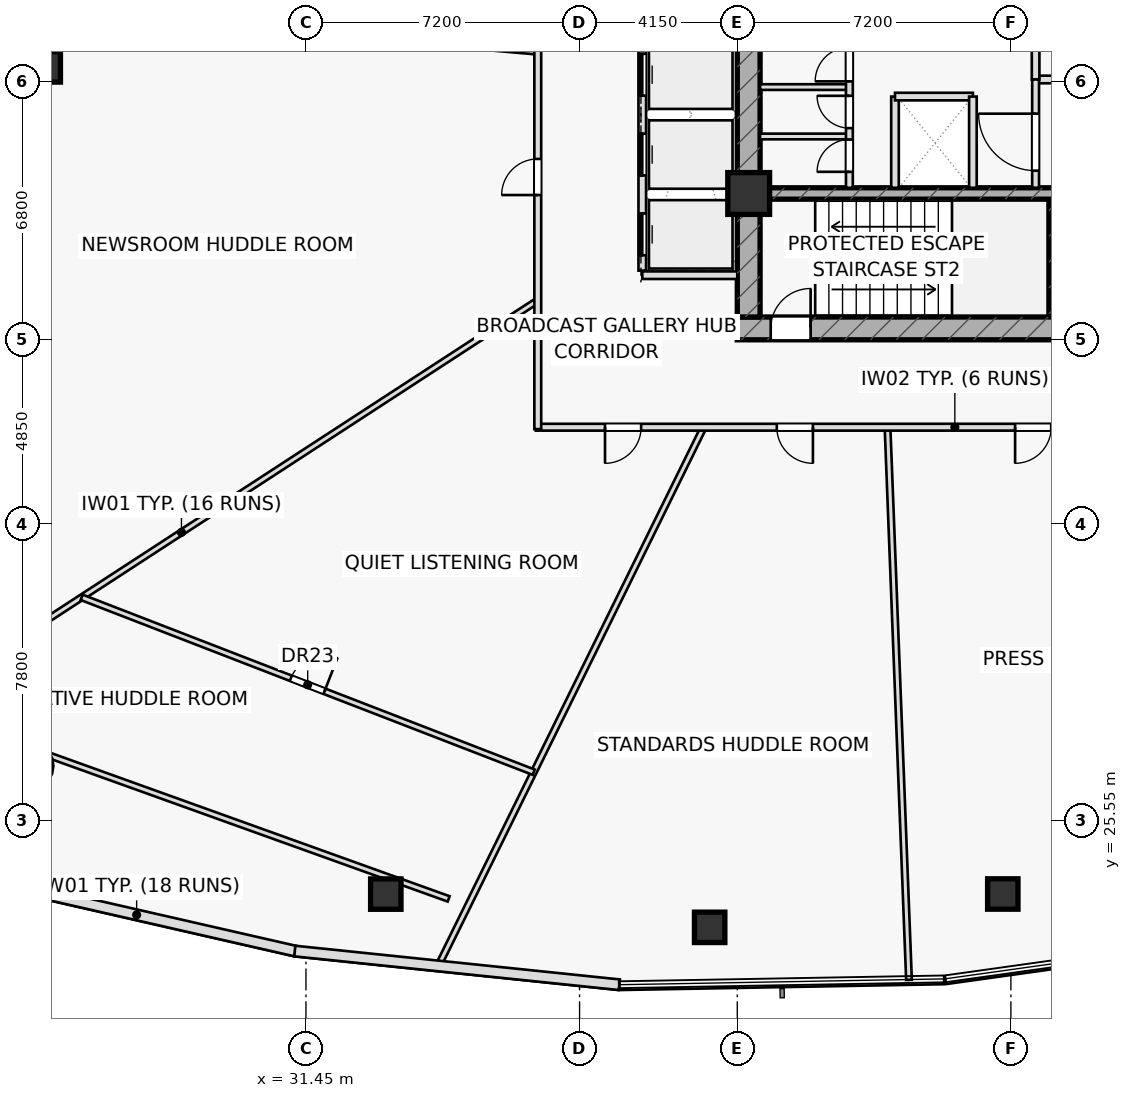
"""IFC4 building model, lengths in metres.
Left out: names, types, materials, properties, quantities, classifications, styles, units other than length and angle.
Written with IfcOpenShell. Run it as: python <this file> out.ifc"""

import sys

from ifc_helpers import new_model, si_unit, direction, frame, frame_2d, origin, origin_2d, place, context, subcontext, project, spatial, rectangle, hollow_rectangle, hollow_circle, extrude, element, fill, save


model = new_model("IFC4")
c1 = context("Model", 3, precision=1e-05, world=origin(), true_north=direction((0.0, 1.0)))
c2 = subcontext(c1, "Body", "Model", "MODEL_VIEW")
j1 = project(units=[si_unit("LENGTHUNIT", "METRE"), si_unit("PLANEANGLEUNIT", "RADIAN")], contexts=[c1])
p1 = place(None, origin())
s1 = spatial("IfcSite", under=j1, at=p1, CompositionType="ELEMENT")
p2 = place(p1, origin())
s2 = spatial("IfcBuilding", under=s1, at=p2, CompositionType="ELEMENT")
p3 = place(p2, frame((0.0, 0.0, 43.2)))
s3 = spatial("IfcBuildingStorey", under=s2, at=p3, CompositionType="ELEMENT", Elevation=43.2)
p4 = place(p3, frame((51.11, 38.8, 0.0), z_axis=(0.0, 0.0, 1.0), x_axis=(0.0, 1.0, 0.0)))
e1 = element("IfcWall", 1, at=p4, inside=s3, PredefinedType="SHEAR", context=c2, shape_type="SweptSolid", body=[
    extrude(rectangle(XDim=3.1, YDim=0.22, at=frame_2d((1.55, 0.0))), origin(), (0.0, 0.0, 1.0), 3.6),
])
p5 = place(p3, frame((42.8, 38.5, 0.0), z_axis=(0.0, 0.0, 1.0), x_axis=(1.0, 0.0, 0.0)))
e2 = element("IfcWall", 2, at=p5, inside=s3, PredefinedType="SHEAR", context=c2, shape_type="SweptSolid", body=[
    extrude(rectangle(XDim=14.4, YDim=0.6, at=frame_2d((7.2, 0.0))), origin(), (0.0, 0.0, 1.0), 3.6),
])
p6 = place(p5, frame((0.88, 0.0, 0.0)))
e3 = element("IfcOpeningElement", 3, at=p6, cuts=e2, PredefinedType="OPENING", context=c2, shape_type="SweptSolid", body=[
    extrude(rectangle(XDim=1.05, YDim=2.2, at=frame_2d((0.525, 1.1))), frame((0.0, 0.31, 0.0), z_axis=(0.0, -1.0, 0.0), x_axis=(1.0, 0.0, 0.0)), (0.0, 0.0, 1.0), 0.62),
])
p7 = place(p3, frame((43.1, 38.8, 0.0), z_axis=(0.0, 0.0, 1.0), x_axis=(0.0, 1.0, 0.0)))
e4 = element("IfcWall", 4, at=p7, inside=s3, PredefinedType="SHEAR", context=c2, shape_type="SweptSolid", body=[
    extrude(rectangle(XDim=12.4, YDim=0.6, at=frame_2d((6.2, 0.0))), origin(), (0.0, 0.0, 1.0), 3.6),
])
p8 = place(p3, frame((43.4, 42.05, 0.0), z_axis=(0.0, 0.0, 1.0), x_axis=(1.0, 0.0, 0.0)))
e5 = element("IfcWall", 5, at=p8, inside=s3, PredefinedType="SHEAR", context=c2, shape_type="SweptSolid", body=[
    extrude(rectangle(XDim=13.2, YDim=0.3, at=frame_2d((6.6, 0.0))), origin(), (0.0, 0.0, 1.0), 3.6),
])
p9 = place(p3, frame((43.1, 42.05, 0.0), z_axis=(0.0, 0.0, 1.0), x_axis=(1.0, 0.0, 0.0)))
e6 = element("IfcColumn", 6, at=p9, inside=s3, PredefinedType="COLUMN", context=c2, shape_type="SweptSolid", body=[
    extrude(rectangle(XDim=1.1, YDim=1.1, at=origin_2d()), origin(), (0.0, 0.0, 1.0), 3.6),
])
p10 = place(p3, frame((24.59, 45.381, 0.0), z_axis=(0.0, 0.0, 1.0), x_axis=(1.0, 0.0, 0.0)))
e7 = element("IfcColumn", 7, at=p10, inside=s3, PredefinedType="COLUMN", context=c2, shape_type="SweptSolid", body=[
    extrude(hollow_rectangle(XDim=0.8, YDim=0.8, WallThickness=0.045, at=origin_2d()), origin(), (0.0, 0.0, 1.0), 3.6),
])
p11 = place(p3, frame((24.159, 26.99, 0.0), z_axis=(0.0, 0.0, 1.0), x_axis=(1.0, 0.0, 0.0)))
e8 = element("IfcColumn", 8, at=p11, inside=s3, PredefinedType="COLUMN", context=c2, shape_type="SweptSolid", body=[
    extrude(hollow_circle(Radius=0.61, WallThickness=0.05, at=origin_2d()), origin(), (0.0, 0.0, 1.0), 3.6),
])
for number, where, z_axis, x_axis in (
    (9, (33.551, 23.615, 0.0), (0.0, 0.0, 1.0), (1.0, 0.0, 0.0)),
    (10, (42.073, 22.74, 0.0), (0.0, 0.0, 1.0), (1.0, 0.0, 0.0)),
    (11, (49.787, 23.618, 0.0), (0.0, 0.0, 1.0), (1.0, 0.0, 0.0)),
):
    element("IfcColumn", number, at=place(p3, frame(where, z_axis=z_axis, x_axis=x_axis)), inside=s3, PredefinedType="COLUMN", context=c2, shape_type="SweptSolid", body=[
        extrude(hollow_rectangle(XDim=0.8, YDim=0.8, WallThickness=0.045, at=origin_2d()), origin(), (0.0, 0.0, 1.0), 3.6),
    ])
p12 = place(p3, frame((40.3, 39.9, 0.0), z_axis=(0.0, 0.0, 1.0), x_axis=(1.0, 0.0, 0.0)))
e12 = element("IfcWall", 12, at=p12, inside=s3, PredefinedType="PARTITIONING", context=c2, shape_type="SweptSolid", body=[
    extrude(rectangle(XDim=2.5, YDim=0.2, at=frame_2d((1.25, 0.0))), origin(), (0.0, 0.0, 1.0), 3.6),
])
p13 = place(p3, frame((46.95, 42.2, 0.0), z_axis=(0.0, 0.0, 1.0), x_axis=(0.0, 1.0, 0.0)))
e13 = element("IfcWall", 13, at=p13, inside=s3, PredefinedType="PARTITIONING", context=c2, shape_type="SweptSolid", body=[
    extrude(rectangle(XDim=2.4, YDim=0.2, at=frame_2d((1.2, 0.0))), origin(), (0.0, 0.0, 1.0), 3.6),
])
p14 = place(p3, frame((46.95, 44.6, 0.0), z_axis=(0.0, 0.0, 1.0), x_axis=(1.0, 0.0, 0.0)))
e14 = element("IfcWall", 14, at=p14, inside=s3, PredefinedType="PARTITIONING", context=c2, shape_type="SweptSolid", body=[
    extrude(rectangle(XDim=2.05, YDim=0.2, at=frame_2d((1.025, 0.0))), origin(), (0.0, 0.0, 1.0), 3.6),
])
p15 = place(p3, frame((50.65, 45.05, 0.0), z_axis=(0.0, 0.0, 1.0), x_axis=(1.0, 0.0, 0.0)))
e15 = element("IfcWall", 15, at=p15, inside=s3, PredefinedType="PARTITIONING", context=c2, shape_type="SweptSolid", body=[
    extrude(rectangle(XDim=5.95, YDim=0.2, at=frame_2d((2.975, 0.0))), origin(), (0.0, 0.0, 1.0), 3.6),
])
p16 = place(p15, frame((1.35, 0.0, 0.0)))
e16 = element("IfcOpeningElement", 16, at=p16, cuts=e15, PredefinedType="OPENING", context=c2, shape_type="SweptSolid", body=[
    extrude(rectangle(XDim=1.5, YDim=2.2, at=frame_2d((0.75, 1.1))), frame((0.0, 0.11, 0.0), z_axis=(0.0, -1.0, 0.0), x_axis=(1.0, 0.0, 0.0)), (0.0, 0.0, 1.0), 0.22),
])
p17 = place(p3, frame((50.65, 45.05, 0.0), z_axis=(0.0, 0.0, 1.0), x_axis=(0.0, 1.0, 0.0)))
e17 = element("IfcWall", 17, at=p17, inside=s3, PredefinedType="PARTITIONING", context=c2, shape_type="SweptSolid", body=[
    extrude(rectangle(XDim=2.75, YDim=0.2, at=frame_2d((1.375, 0.0))), origin(), (0.0, 0.0, 1.0), 3.6),
])
p18 = place(p3, frame((50.65, 42.2, 0.0), z_axis=(0.0, 0.0, 1.0), x_axis=(0.0, 1.0, 0.0)))
e18 = element("IfcWall", 18, at=p18, inside=s3, PredefinedType="PARTITIONING", context=c2, shape_type="SweptSolid", body=[
    extrude(rectangle(XDim=2.85, YDim=0.18, at=frame_2d((1.425, 0.0))), origin(), (0.0, 0.0, 1.0), 3.6),
])
p19 = place(p18, frame((0.45, 0.0, 0.0)))
e19 = element("IfcOpeningElement", 19, at=p19, cuts=e18, PredefinedType="OPENING", context=c2, shape_type="SweptSolid", body=[
    extrude(rectangle(XDim=1.5, YDim=2.2, at=frame_2d((0.75, 1.1))), frame((0.0, 0.1, 0.0), z_axis=(0.0, -1.0, 0.0), x_axis=(1.0, 0.0, 0.0)), (0.0, 0.0, 1.0), 0.2),
])
for number, where, z_axis, x_axis in (
    (20, (43.4, 43.55, 0.0), (0.0, 0.0, 1.0), (1.0, 0.0, 0.0)),
    (21, (43.4, 44.85, 0.0), (0.0, 0.0, 1.0), (1.0, 0.0, 0.0)),
):
    element("IfcWall", number, at=place(p3, frame(where, z_axis=z_axis, x_axis=x_axis)), inside=s3, PredefinedType="PARTITIONING", context=c2, shape_type="SweptSolid", body=[
        extrude(rectangle(XDim=2.35, YDim=0.15, at=frame_2d((1.175, 0.0))), origin(), (0.0, 0.0, 1.0), 3.6),
    ])
p20 = place(p3, frame((45.75, 42.2, 0.0), z_axis=(0.0, 0.0, 1.0), x_axis=(0.0, 1.0, 0.0)))
e22 = element("IfcWall", 22, at=p20, inside=s3, PredefinedType="PARTITIONING", context=c2, shape_type="SweptSolid", body=[
    extrude(rectangle(XDim=5.6, YDim=0.18, at=frame_2d((2.8, 0.0))), origin(), (0.0, 0.0, 1.0), 3.6),
])
p21 = place(p20, frame((0.42, 0.0, 0.0)))
e23 = element("IfcOpeningElement", 23, at=p21, cuts=e22, PredefinedType="OPENING", context=c2, shape_type="SweptSolid", body=[
    extrude(rectangle(XDim=0.85, YDim=2.05, at=frame_2d((0.425, 1.025))), frame((0.0, 0.1, 0.0), z_axis=(0.0, -1.0, 0.0), x_axis=(1.0, 0.0, 0.0)), (0.0, 0.0, 1.0), 0.2),
])
p22 = place(p20, frame((1.57, 0.0, 0.0)))
e24 = element("IfcOpeningElement", 24, at=p22, cuts=e22, PredefinedType="OPENING", context=c2, shape_type="SweptSolid", body=[
    extrude(rectangle(XDim=0.85, YDim=2.05, at=frame_2d((0.425, 1.025))), frame((0.0, 0.1, 0.0), z_axis=(0.0, -1.0, 0.0), x_axis=(1.0, 0.0, 0.0)), (0.0, 0.0, 1.0), 0.2),
])
p23 = place(p20, frame((2.8, 0.0, 0.0)))
e25 = element("IfcOpeningElement", 25, at=p23, cuts=e22, PredefinedType="OPENING", context=c2, shape_type="SweptSolid", body=[
    extrude(rectangle(XDim=0.9, YDim=2.05, at=frame_2d((0.45, 1.025))), frame((0.0, 0.1, 0.0), z_axis=(0.0, -1.0, 0.0), x_axis=(1.0, 0.0, 0.0)), (0.0, 0.0, 1.0), 0.2),
])
p24 = place(p3, frame((22.802, 27.945, 0.0), z_axis=(0.0, 0.0, 1.0), x_axis=(0.941102349209, -0.338121824662, 0.0)))
e26 = element("IfcWall", 26, at=p24, inside=s3, PredefinedType="PARTITIONING", context=c2, shape_type="SweptSolid", body=[
    extrude(rectangle(XDim=13.18, YDim=0.15, at=frame_2d((6.59, 0.0))), origin(), (0.0, 0.0, 1.0), 2.925),
])
p25 = place(p3, frame((37.55, 45.78, 0.0), z_axis=(0.0, 0.0, 1.0), x_axis=(-0.996136872502, 0.087814185882, 0.0)))
e27 = element("IfcWall", 27, at=p25, inside=s3, PredefinedType="PARTITIONING", context=c2, shape_type="SweptSolid", body=[
    extrude(rectangle(XDim=15.839, YDim=0.15, at=frame_2d((7.919, 0.0))), origin(), (0.0, 0.0, 1.0), 2.925),
])
p26 = place(p3, frame((37.55, 39.238, 0.0), z_axis=(0.0, 0.0, 1.0), x_axis=(-0.838030337593, -0.545623637019, 0.0)))
e28 = element("IfcWall", 28, at=p26, inside=s3, PredefinedType="PARTITIONING", context=c2, shape_type="SweptSolid", body=[
    extrude(rectangle(XDim=22.377, YDim=0.15, at=frame_2d((11.188, 0.0))), origin(), (0.0, 0.0, 1.0), 2.925),
])
p27 = place(p3, frame((41.916, 35.9, 0.0), z_axis=(0.0, 0.0, 1.0), x_axis=(-0.442006147161, -0.89701202103, 0.0)))
e29 = element("IfcWall", 29, at=p27, inside=s3, PredefinedType="PARTITIONING", context=c2, shape_type="SweptSolid", body=[
    extrude(rectangle(XDim=15.813, YDim=0.15, at=frame_2d((7.907, 0.0))), origin(), (0.0, 0.0, 1.0), 2.975),
])
p28 = place(p3, frame((46.753, 35.9, 0.0), z_axis=(0.0, 0.0, 1.0), x_axis=(0.038834483787, -0.999245656918, 0.0)))
e30 = element("IfcWall", 30, at=p28, inside=s3, PredefinedType="PARTITIONING", context=c2, shape_type="SweptSolid", body=[
    extrude(rectangle(XDim=14.554, YDim=0.15, at=frame_2d((7.277, 0.0))), origin(), (0.0, 0.0, 1.0), 2.925),
])
p29 = place(p3, frame((25.548, 31.424, 0.0), z_axis=(0.0, 0.0, 1.0), x_axis=(0.932625879007, -0.360844800166, 0.0)))
e31 = element("IfcWall", 31, at=p29, inside=s3, PredefinedType="PARTITIONING", context=c2, shape_type="SweptSolid", body=[
    extrude(rectangle(XDim=12.754, YDim=0.15, at=frame_2d((6.377, 0.0))), origin(), (0.0, 0.0, 1.0), 2.925),
])
p30 = place(p29, frame((5.902, 0.0, 0.0)))
e32 = element("IfcOpeningElement", 32, at=p30, cuts=e31, PredefinedType="OPENING", context=c2, shape_type="SweptSolid", body=[
    extrude(rectangle(XDim=0.95, YDim=2.05, at=frame_2d((0.475, 1.025))), frame((0.0, 0.085, 0.0), z_axis=(0.0, -1.0, 0.0), x_axis=(1.0, 0.0, 0.0)), (0.0, 0.0, 1.0), 0.17),
])
p31 = place(p3, frame((59.55, 35.9, 0.0), z_axis=(0.0, 0.0, 1.0), x_axis=(-1.0, 0.0, 0.0)))
e33 = element("IfcWall", 33, at=p31, inside=s3, PredefinedType="PARTITIONING", context=c2, shape_type="SweptSolid", body=[
    extrude(rectangle(XDim=22.05, YDim=0.18, at=frame_2d((11.025, 0.0))), origin(), (0.0, 0.0, 1.0), 2.925),
])
p32 = place(p31, frame((2.193, 0.0, 0.0)))
e34 = element("IfcOpeningElement", 34, at=p32, cuts=e33, PredefinedType="OPENING", context=c2, shape_type="SweptSolid", body=[
    extrude(rectangle(XDim=0.95, YDim=2.05, at=frame_2d((0.475, 1.025))), frame((0.0, 0.1, 0.0), z_axis=(0.0, -1.0, 0.0), x_axis=(1.0, 0.0, 0.0)), (0.0, 0.0, 1.0), 0.2),
])
p33 = place(p31, frame((8.49, 0.0, 0.0)))
e35 = element("IfcOpeningElement", 35, at=p33, cuts=e33, PredefinedType="OPENING", context=c2, shape_type="SweptSolid", body=[
    extrude(rectangle(XDim=0.95, YDim=2.05, at=frame_2d((0.475, 1.025))), frame((0.0, 0.1, 0.0), z_axis=(0.0, -1.0, 0.0), x_axis=(1.0, 0.0, 0.0)), (0.0, 0.0, 1.0), 0.2),
])
p34 = place(p31, frame((14.76, 0.0, 0.0)))
e36 = element("IfcOpeningElement", 36, at=p34, cuts=e33, PredefinedType="OPENING", context=c2, shape_type="SweptSolid", body=[
    extrude(rectangle(XDim=0.95, YDim=2.05, at=frame_2d((0.475, 1.025))), frame((0.0, 0.1, 0.0), z_axis=(0.0, -1.0, 0.0), x_axis=(1.0, 0.0, 0.0)), (0.0, 0.0, 1.0), 0.2),
])
p35 = place(p31, frame((19.281, 0.0, 0.0)))
e37 = element("IfcOpeningElement", 37, at=p35, cuts=e33, PredefinedType="OPENING", context=c2, shape_type="SweptSolid", body=[
    extrude(rectangle(XDim=0.95, YDim=2.05, at=frame_2d((0.475, 1.025))), frame((0.0, 0.1, 0.0), z_axis=(0.0, -1.0, 0.0), x_axis=(1.0, 0.0, 0.0)), (0.0, 0.0, 1.0), 0.2),
])
p36 = place(p3, frame((37.55, 35.85, 0.0), z_axis=(0.0, 0.0, 1.0), x_axis=(0.0, 1.0, 0.0)))
e38 = element("IfcWall", 38, at=p36, inside=s3, PredefinedType="PARTITIONING", context=c2, shape_type="SweptSolid", body=[
    extrude(rectangle(XDim=12.65, YDim=0.18, at=frame_2d((6.325, 0.0))), origin(), (0.0, 0.0, 1.0), 2.925),
])
p37 = place(p36, frame((6.159, 0.0, 0.0)))
e39 = element("IfcOpeningElement", 39, at=p37, cuts=e38, PredefinedType="OPENING", context=c2, shape_type="SweptSolid", body=[
    extrude(rectangle(XDim=0.95, YDim=2.05, at=frame_2d((0.475, 1.025))), frame((0.0, 0.1, 0.0), z_axis=(0.0, -1.0, 0.0), x_axis=(1.0, 0.0, 0.0)), (0.0, 0.0, 1.0), 0.2),
])
p38 = place(p3, frame((22.804, 24.028, 0.0), z_axis=(0.0, 0.0, 1.0), x_axis=(0.974855686906, -0.222837137181, 0.0)))
e40 = element("IfcWall", 40, at=p38, inside=s3, PredefinedType="STANDARD", context=c2, shape_type="SweptSolid", body=[
    extrude(rectangle(XDim=8.598, YDim=0.28, at=frame_2d((4.299, 0.0))), origin(), (0.0, 0.0, 1.0), 3.6),
])
p39 = place(p3, frame((31.156, 22.117, 0.0), z_axis=(0.0, 0.0, 1.0), x_axis=(0.994656310242, -0.103241583171, 0.0)))
e41 = element("IfcWall", 41, at=p39, inside=s3, PredefinedType="STANDARD", context=c2, shape_type="SweptSolid", body=[
    extrude(rectangle(XDim=8.586, YDim=0.28, at=frame_2d((4.293, 0.0))), origin(), (0.0, 0.0, 1.0), 3.6),
])
p40 = place(p3, frame((40.3, 40.02, 0.0), z_axis=(0.0, 0.0, 1.0), x_axis=(0.0, 1.0, 0.0)))
e42 = element("IfcWall", 42, at=p40, inside=s3, PredefinedType="PARTITIONING", context=c2, shape_type="SweptSolid", body=[
    extrude(rectangle(XDim=8.21, YDim=0.2, at=frame_2d((4.105, 0.0))), origin(), (0.0, 0.0, 1.0), 3.6),
])
p41 = place(p40, frame((0.405, 0.0, 0.0)))
e43 = element("IfcOpeningElement", 43, at=p41, cuts=e42, PredefinedType="OPENING", context=c2, shape_type="SweptSolid", body=[
    extrude(rectangle(XDim=1.1, YDim=2.15, at=frame_2d((0.55, 1.075))), frame((0.0, 0.11, 0.0), z_axis=(0.0, -1.0, 0.0), x_axis=(1.0, 0.0, 0.0)), (0.0, 0.0, 1.0), 0.22),
])
p42 = place(p40, frame((2.505, 0.0, 0.0)))
e44 = element("IfcOpeningElement", 44, at=p42, cuts=e42, PredefinedType="OPENING", context=c2, shape_type="SweptSolid", body=[
    extrude(rectangle(XDim=1.1, YDim=2.15, at=frame_2d((0.55, 1.075))), frame((0.0, 0.11, 0.0), z_axis=(0.0, -1.0, 0.0), x_axis=(1.0, 0.0, 0.0)), (0.0, 0.0, 1.0), 0.22),
])
p43 = place(p40, frame((4.605, 0.0, 0.0)))
e45 = element("IfcOpeningElement", 45, at=p43, cuts=e42, PredefinedType="OPENING", context=c2, shape_type="SweptSolid", body=[
    extrude(rectangle(XDim=1.1, YDim=2.15, at=frame_2d((0.55, 1.075))), frame((0.0, 0.11, 0.0), z_axis=(0.0, -1.0, 0.0), x_axis=(1.0, 0.0, 0.0)), (0.0, 0.0, 1.0), 0.22),
])
p44 = place(p40, frame((6.705, 0.0, 0.0)))
e46 = element("IfcOpeningElement", 46, at=p44, cuts=e42, PredefinedType="OPENING", context=c2, shape_type="SweptSolid", body=[
    extrude(rectangle(XDim=1.1, YDim=2.15, at=frame_2d((0.55, 1.075))), frame((0.0, 0.11, 0.0), z_axis=(0.0, -1.0, 0.0), x_axis=(1.0, 0.0, 0.0)), (0.0, 0.0, 1.0), 0.22),
])
p45 = place(p3, frame((49.0, 42.2, 0.0), z_axis=(0.0, 0.0, 1.0), x_axis=(0.0, 1.0, 0.0)))
e47 = element("IfcWall", 47, at=p45, inside=s3, PredefinedType="PARTITIONING", context=c2, shape_type="SweptSolid", body=[
    extrude(rectangle(XDim=2.4, YDim=0.2, at=frame_2d((1.2, 0.0))), origin(), (0.0, 0.0, 1.0), 3.6),
])
p46 = place(p6, origin())
e48 = element("IfcDoor", 48, at=p46, inside=s3, OperationType="SINGLE_SWING_RIGHT", PredefinedType="DOOR", context=c2, shape_type="SweptSolid", body=[
    extrude(rectangle(XDim=1.05, YDim=2.2, at=frame_2d((0.525, 1.1))), frame((0.0, 0.025, 0.0), z_axis=(0.0, -1.0, 0.0), x_axis=(1.0, 0.0, 0.0)), (0.0, 0.0, 1.0), 0.05),
])
fill(e3, e48)
p47 = place(p19, origin())
e49 = element("IfcDoor", 49, at=p47, inside=s3, OperationType="SINGLE_SWING_RIGHT", PredefinedType="DOOR", context=c2, shape_type="SweptSolid", body=[
    extrude(rectangle(XDim=1.5, YDim=2.2, at=frame_2d((0.75, 1.1))), frame((0.0, 0.025, 0.0), z_axis=(0.0, -1.0, 0.0), x_axis=(1.0, 0.0, 0.0)), (0.0, 0.0, 1.0), 0.05),
])
fill(e19, e49)
p48 = place(p21, origin())
e50 = element("IfcDoor", 50, at=p48, inside=s3, OperationType="SINGLE_SWING_LEFT", PredefinedType="DOOR", context=c2, shape_type="SweptSolid", body=[
    extrude(rectangle(XDim=0.85, YDim=2.05, at=frame_2d((0.425, 1.025))), frame((0.0, 0.025, 0.0), z_axis=(0.0, -1.0, 0.0), x_axis=(1.0, 0.0, 0.0)), (0.0, 0.0, 1.0), 0.05),
])
fill(e23, e50)
p49 = place(p22, origin())
e51 = element("IfcDoor", 51, at=p49, inside=s3, OperationType="SINGLE_SWING_RIGHT", PredefinedType="DOOR", context=c2, shape_type="SweptSolid", body=[
    extrude(rectangle(XDim=0.85, YDim=2.05, at=frame_2d((0.425, 1.025))), frame((0.0, 0.025, 0.0), z_axis=(0.0, -1.0, 0.0), x_axis=(1.0, 0.0, 0.0)), (0.0, 0.0, 1.0), 0.05),
])
fill(e24, e51)
p50 = place(p23, origin())
e52 = element("IfcDoor", 52, at=p50, inside=s3, OperationType="SINGLE_SWING_LEFT", PredefinedType="DOOR", context=c2, shape_type="SweptSolid", body=[
    extrude(rectangle(XDim=0.9, YDim=2.05, at=frame_2d((0.45, 1.025))), frame((0.0, 0.025, 0.0), z_axis=(0.0, -1.0, 0.0), x_axis=(1.0, 0.0, 0.0)), (0.0, 0.0, 1.0), 0.05),
])
fill(e25, e52)
p51 = place(p30, origin())
e53 = element("IfcDoor", 53, at=p51, inside=s3, OperationType="SINGLE_SWING_RIGHT", PredefinedType="DOOR", context=c2, shape_type="SweptSolid", body=[
    extrude(rectangle(XDim=0.95, YDim=2.05, at=frame_2d((0.475, 1.025))), frame((0.0, 0.025, 0.0), z_axis=(0.0, -1.0, 0.0), x_axis=(1.0, 0.0, 0.0)), (0.0, 0.0, 1.0), 0.05),
])
fill(e32, e53)
p52 = place(p33, origin())
e54 = element("IfcDoor", 54, at=p52, inside=s3, OperationType="SINGLE_SWING_RIGHT", PredefinedType="DOOR", context=c2, shape_type="SweptSolid", body=[
    extrude(rectangle(XDim=0.95, YDim=2.05, at=frame_2d((0.475, 1.025))), frame((0.0, 0.025, 0.0), z_axis=(0.0, -1.0, 0.0), x_axis=(1.0, 0.0, 0.0)), (0.0, 0.0, 1.0), 0.05),
])
fill(e35, e54)
p53 = place(p34, origin())
e55 = element("IfcDoor", 55, at=p53, inside=s3, OperationType="SINGLE_SWING_LEFT", PredefinedType="DOOR", context=c2, shape_type="SweptSolid", body=[
    extrude(rectangle(XDim=0.95, YDim=2.05, at=frame_2d((0.475, 1.025))), frame((0.0, 0.025, 0.0), z_axis=(0.0, -1.0, 0.0), x_axis=(1.0, 0.0, 0.0)), (0.0, 0.0, 1.0), 0.05),
])
fill(e36, e55)
p54 = place(p35, origin())
e56 = element("IfcDoor", 56, at=p54, inside=s3, OperationType="SINGLE_SWING_RIGHT", PredefinedType="DOOR", context=c2, shape_type="SweptSolid", body=[
    extrude(rectangle(XDim=0.95, YDim=2.05, at=frame_2d((0.475, 1.025))), frame((0.0, 0.025, 0.0), z_axis=(0.0, -1.0, 0.0), x_axis=(1.0, 0.0, 0.0)), (0.0, 0.0, 1.0), 0.05),
])
fill(e37, e56)
p55 = place(p37, origin())
e57 = element("IfcDoor", 57, at=p55, inside=s3, OperationType="SINGLE_SWING_LEFT", PredefinedType="DOOR", context=c2, shape_type="SweptSolid", body=[
    extrude(rectangle(XDim=0.95, YDim=2.05, at=frame_2d((0.475, 1.025))), frame((0.0, 0.025, 0.0), z_axis=(0.0, -1.0, 0.0), x_axis=(1.0, 0.0, 0.0)), (0.0, 0.0, 1.0), 0.05),
])
fill(e39, e57)
p56 = place(p41, origin())
e58 = element("IfcDoor", 58, at=p56, inside=s3, OperationType="SLIDING_TO_LEFT", PredefinedType="DOOR", context=c2, shape_type="SweptSolid", body=[
    extrude(rectangle(XDim=1.1, YDim=2.15, at=frame_2d((0.55, 1.075))), frame((0.0, 0.025, 0.0), z_axis=(0.0, -1.0, 0.0), x_axis=(1.0, 0.0, 0.0)), (0.0, 0.0, 1.0), 0.05),
])
fill(e43, e58)
p57 = place(p42, origin())
e59 = element("IfcDoor", 59, at=p57, inside=s3, OperationType="SLIDING_TO_RIGHT", PredefinedType="DOOR", context=c2, shape_type="SweptSolid", body=[
    extrude(rectangle(XDim=1.1, YDim=2.15, at=frame_2d((0.55, 1.075))), frame((0.0, 0.025, 0.0), z_axis=(0.0, -1.0, 0.0), x_axis=(1.0, 0.0, 0.0)), (0.0, 0.0, 1.0), 0.05),
])
fill(e44, e59)
p58 = place(p43, origin())
e60 = element("IfcDoor", 60, at=p58, inside=s3, OperationType="SLIDING_TO_LEFT", PredefinedType="DOOR", context=c2, shape_type="SweptSolid", body=[
    extrude(rectangle(XDim=1.1, YDim=2.15, at=frame_2d((0.55, 1.075))), frame((0.0, 0.025, 0.0), z_axis=(0.0, -1.0, 0.0), x_axis=(1.0, 0.0, 0.0)), (0.0, 0.0, 1.0), 0.05),
])
fill(e45, e60)
save(model, sys.argv[1])
